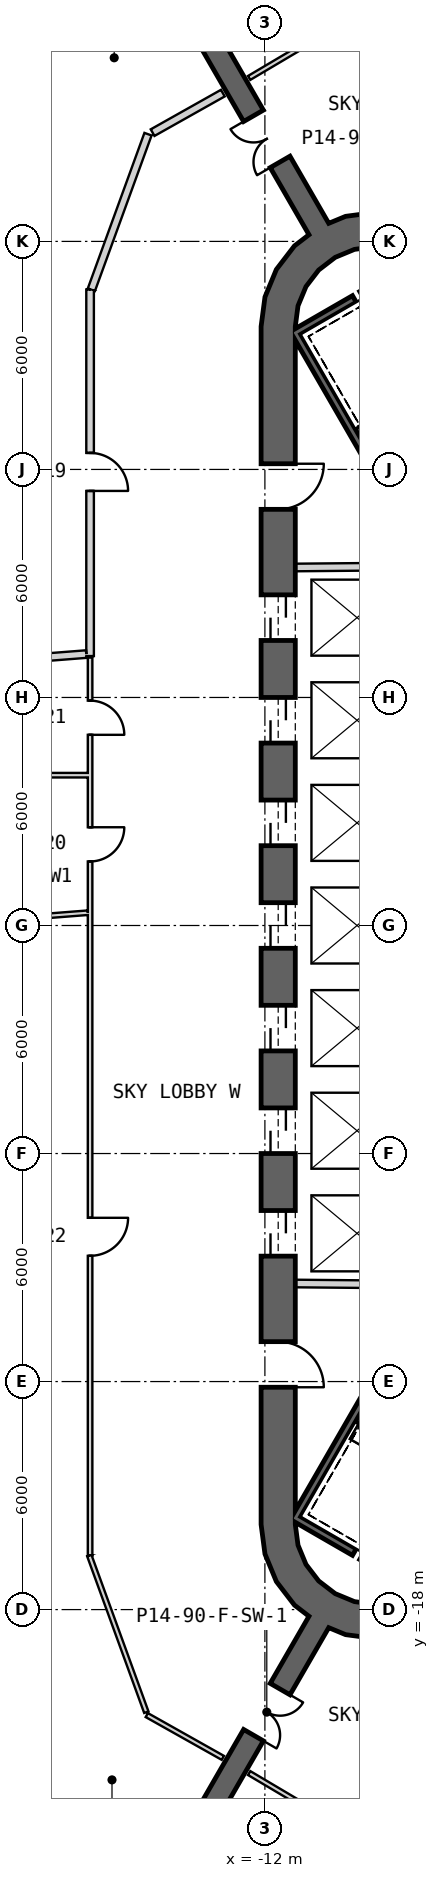
"""IFC4 building model, lengths in metres.
Left out: names, types, materials, properties, quantities, classifications, styles, units other than length and angle.
Written with IfcOpenShell. Run it as: python <this file> out.ifc"""

import sys

from ifc_helpers import new_model, si_unit, direction, frame, frame_2d, origin, place, context, subcontext, project, spatial, polyline, rectangle, outline, extrude, element, fill, save


model = new_model("IFC4")
c1 = context("Model", 3, precision=1e-05, world=origin(), true_north=direction((0.0, 1.0)))
c2 = subcontext(c1, "Body", "Model", "MODEL_VIEW")
j1 = project(units=[si_unit("LENGTHUNIT", "METRE"), si_unit("PLANEANGLEUNIT", "RADIAN")], contexts=[c1])
p1 = place(None, origin())
s1 = spatial("IfcSite", under=j1, at=p1, CompositionType="ELEMENT")
p2 = place(p1, origin())
s2 = spatial("IfcBuilding", under=s1, at=p2, CompositionType="ELEMENT")
p3 = place(p2, frame((0.0, 0.0, 392.3)))
s3 = spatial("IfcBuildingStorey", under=s2, at=p3, CompositionType="ELEMENT", Elevation=392.3)
p4 = place(p3, frame((-11.65, 15.762, 0.0), z_axis=(0.0, 0.0, 1.0), x_axis=(0.0, -1.0, 0.0)))
e1 = element("IfcWall", 1, at=p4, inside=s3, PredefinedType="SHEAR", context=c2, shape_type="SweptSolid", body=[
    extrude(rectangle(XDim=31.523, YDim=0.9, at=frame_2d((15.762, 0.0))), origin(), (0.0, 0.0, 1.0), 6.0),
])
p5 = place(p4, frame((7.062, 0.0, 0.0)))
e2 = element("IfcOpeningElement", 2, at=p5, cuts=e1, PredefinedType="OPENING", context=c2, shape_type="SweptSolid", body=[
    extrude(rectangle(XDim=1.2, YDim=2.4, at=frame_2d((0.6, 1.2))), frame((0.0, 0.46, 0.0), z_axis=(0.0, -1.0, 0.0), x_axis=(1.0, 0.0, 0.0)), (0.0, 0.0, 1.0), 0.92),
])
p6 = place(p4, frame((9.762, 0.0, 0.0)))
e3 = element("IfcOpeningElement", 3, at=p6, cuts=e1, PredefinedType="OPENING", context=c2, shape_type="SweptSolid", body=[
    extrude(rectangle(XDim=1.2, YDim=2.4, at=frame_2d((0.6, 1.2))), frame((0.0, 0.46, 0.0), z_axis=(0.0, -1.0, 0.0), x_axis=(1.0, 0.0, 0.0)), (0.0, 0.0, 1.0), 0.92),
])
p7 = place(p4, frame((12.462, 0.0, 0.0)))
e4 = element("IfcOpeningElement", 4, at=p7, cuts=e1, PredefinedType="OPENING", context=c2, shape_type="SweptSolid", body=[
    extrude(rectangle(XDim=1.2, YDim=2.4, at=frame_2d((0.6, 1.2))), frame((0.0, 0.46, 0.0), z_axis=(0.0, -1.0, 0.0), x_axis=(1.0, 0.0, 0.0)), (0.0, 0.0, 1.0), 0.92),
])
p8 = place(p4, frame((15.162, 0.0, 0.0)))
e5 = element("IfcOpeningElement", 5, at=p8, cuts=e1, PredefinedType="OPENING", context=c2, shape_type="SweptSolid", body=[
    extrude(rectangle(XDim=1.2, YDim=2.4, at=frame_2d((0.6, 1.2))), frame((0.0, 0.46, 0.0), z_axis=(0.0, -1.0, 0.0), x_axis=(1.0, 0.0, 0.0)), (0.0, 0.0, 1.0), 0.92),
])
p9 = place(p4, frame((17.862, 0.0, 0.0)))
e6 = element("IfcOpeningElement", 6, at=p9, cuts=e1, PredefinedType="OPENING", context=c2, shape_type="SweptSolid", body=[
    extrude(rectangle(XDim=1.2, YDim=2.4, at=frame_2d((0.6, 1.2))), frame((0.0, 0.46, 0.0), z_axis=(0.0, -1.0, 0.0), x_axis=(1.0, 0.0, 0.0)), (0.0, 0.0, 1.0), 0.92),
])
p10 = place(p4, frame((20.562, 0.0, 0.0)))
e7 = element("IfcOpeningElement", 7, at=p10, cuts=e1, PredefinedType="OPENING", context=c2, shape_type="SweptSolid", body=[
    extrude(rectangle(XDim=1.2, YDim=2.4, at=frame_2d((0.6, 1.2))), frame((0.0, 0.46, 0.0), z_axis=(0.0, -1.0, 0.0), x_axis=(1.0, 0.0, 0.0)), (0.0, 0.0, 1.0), 0.92),
])
p11 = place(p4, frame((23.262, 0.0, 0.0)))
e8 = element("IfcOpeningElement", 8, at=p11, cuts=e1, PredefinedType="OPENING", context=c2, shape_type="SweptSolid", body=[
    extrude(rectangle(XDim=1.2, YDim=2.4, at=frame_2d((0.6, 1.2))), frame((0.0, 0.46, 0.0), z_axis=(0.0, -1.0, 0.0), x_axis=(1.0, 0.0, 0.0)), (0.0, 0.0, 1.0), 0.92),
])
p12 = place(p4, frame((3.612, 0.0, 0.0)))
e9 = element("IfcOpeningElement", 9, at=p12, cuts=e1, PredefinedType="OPENING", context=c2, shape_type="SweptSolid", body=[
    extrude(rectangle(XDim=1.2, YDim=2.4, at=frame_2d((0.6, 1.2))), frame((0.0, 0.46, 0.0), z_axis=(0.0, -1.0, 0.0), x_axis=(1.0, 0.0, 0.0)), (0.0, 0.0, 1.0), 0.92),
])
p13 = place(p4, frame((26.712, 0.0, 0.0)))
e10 = element("IfcOpeningElement", 10, at=p13, cuts=e1, PredefinedType="OPENING", context=c2, shape_type="SweptSolid", body=[
    extrude(rectangle(XDim=1.2, YDim=2.4, at=frame_2d((0.6, 1.2))), frame((0.0, 0.46, 0.0), z_axis=(0.0, -1.0, 0.0), x_axis=(1.0, 0.0, 0.0)), (0.0, 0.0, 1.0), 0.92),
])
p14 = place(p3, origin())
e11 = element("IfcWall", 11, at=p14, inside=s3, PredefinedType="SHEAR", context=c2, shape_type="SweptSolid", body=[
    extrude(outline(polyline([(-7.6, 18.36), (-8.323, 18.659), (-9.1, 18.762), (-9.876, 18.659), (-10.6, 18.36), (-11.221, 17.883), (-11.698, 17.262), (-11.998, 16.538), (-12.1, 15.762), (-11.2, 15.762), (-11.128, 16.305), (-10.919, 16.812), (-10.585, 17.247), (-10.15, 17.58), (-9.644, 17.79), (-9.1, 17.862), (-8.556, 17.79), (-8.05, 17.58), (-7.6, 18.36)])), origin(), (0.0, 0.0, 1.0), 6.0),
])
p15 = place(p3, origin())
e12 = element("IfcWall", 12, at=p15, inside=s3, PredefinedType="SHEAR", context=c2, shape_type="SweptSolid", body=[
    extrude(outline(polyline([(-12.1, -15.762), (-11.998, -16.538), (-11.698, -17.262), (-11.221, -17.883), (-10.6, -18.36), (-9.876, -18.659), (-9.1, -18.762), (-8.323, -18.659), (-7.6, -18.36), (-8.05, -17.58), (-8.556, -17.79), (-9.1, -17.862), (-9.644, -17.79), (-10.15, -17.58), (-10.585, -17.247), (-10.919, -16.812), (-11.128, -16.305), (-11.2, -15.762), (-12.1, -15.762)])), origin(), (0.0, 0.0, 1.0), 6.0),
])
p16 = place(p3, frame((-10.575, 18.316, 0.0), z_axis=(0.0, 0.0, 1.0), x_axis=(-0.500011655475, 0.866018674388, 0.0)))
e13 = element("IfcWall", 13, at=p16, inside=s3, PredefinedType="SHEAR", context=c2, shape_type="SweptSolid", body=[
    extrude(rectangle(XDim=6.455, YDim=0.6, at=frame_2d((3.228, 0.0))), origin(), (0.0, 0.0, 1.0), 6.0),
])
p17 = place(p16, frame((2.05, 0.0, 0.0)))
e14 = element("IfcOpeningElement", 14, at=p17, cuts=e13, PredefinedType="OPENING", context=c2, shape_type="SweptSolid", body=[
    extrude(rectangle(XDim=1.4, YDim=2.4, at=frame_2d((0.7, 1.2))), frame((0.0, 0.31, 0.0), z_axis=(0.0, -1.0, 0.0), x_axis=(1.0, 0.0, 0.0)), (0.0, 0.0, 1.0), 0.62),
])
p18 = place(p3, frame((-10.575, -18.316, 0.0), z_axis=(0.0, 0.0, 1.0), x_axis=(-0.500011655475, -0.866018674388, 0.0)))
e15 = element("IfcWall", 15, at=p18, inside=s3, PredefinedType="SHEAR", context=c2, shape_type="SweptSolid", body=[
    extrude(rectangle(XDim=6.455, YDim=0.6, at=frame_2d((3.228, 0.0))), origin(), (0.0, 0.0, 1.0), 6.0),
])
p19 = place(p18, frame((2.05, 0.0, 0.0)))
e16 = element("IfcOpeningElement", 16, at=p19, cuts=e15, PredefinedType="OPENING", context=c2, shape_type="SweptSolid", body=[
    extrude(rectangle(XDim=1.4, YDim=2.4, at=frame_2d((0.7, 1.2))), frame((0.0, 0.31, 0.0), z_axis=(0.0, -1.0, 0.0), x_axis=(1.0, 0.0, 0.0)), (0.0, 0.0, 1.0), 0.62),
])
p20 = place(p3, frame((-11.2, 9.42, 0.0), z_axis=(0.0, 0.0, 1.0), x_axis=(0.999957167047, 0.009255488683, 0.0)))
e17 = element("IfcWall", 17, at=p20, inside=s3, PredefinedType="PLUMBINGWALL", context=c2, shape_type="SweptSolid", body=[
    extrude(rectangle(XDim=3.35, YDim=0.2, at=frame_2d((1.675, 0.0))), origin(), (0.0, 0.0, 1.0), 5.7),
])
p21 = place(p3, frame((-8.05, -9.449, 0.0), z_axis=(0.0, 0.0, 1.0), x_axis=(-0.999957467379, 0.009222983926, 0.0)))
e18 = element("IfcWall", 18, at=p21, inside=s3, PredefinedType="PLUMBINGWALL", context=c2, shape_type="SweptSolid", body=[
    extrude(rectangle(XDim=3.15, YDim=0.2, at=frame_2d((1.575, 0.0))), origin(), (0.0, 0.0, 1.0), 5.7),
])
p22 = place(p3, frame((-11.245, 15.678, -0.35), z_axis=(0.0, 0.0, 1.0), x_axis=(0.499977274689, -0.866038523851, 0.0)))
e19 = element("IfcWall", 19, at=p22, inside=s3, PredefinedType="SHEAR", context=c2, shape_type="SweptSolid", body=[
    extrude(rectangle(XDim=8.1, YDim=0.2, at=frame_2d((4.05, 0.0))), origin(), (0.0, 0.0, 1.0), 6.05),
])
p23 = place(p3, frame((-9.645, 16.486, -0.35), z_axis=(0.0, 0.0, 1.0), x_axis=(-0.866038843867, -0.499976720371, 0.0)))
e20 = element("IfcWall", 20, at=p23, inside=s3, PredefinedType="SHEAR", context=c2, shape_type="SweptSolid", body=[
    extrude(rectangle(XDim=1.69, YDim=0.2, at=frame_2d((0.845, 0.0))), origin(), (0.0, 0.0, 1.0), 6.05),
])
p24 = place(p3, frame((-11.282, -15.541, -0.35), z_axis=(0.0, 0.0, 1.0), x_axis=(0.866000578957, -0.500042995397, 0.0)))
e21 = element("IfcWall", 21, at=p24, inside=s3, PredefinedType="SHEAR", context=c2, shape_type="SweptSolid", body=[
    extrude(rectangle(XDim=1.89, YDim=0.2, at=frame_2d((0.945, 0.0))), origin(), (0.0, 0.0, 1.0), 6.05),
])
p25 = place(p3, frame((-7.196, -8.663, -0.35), z_axis=(0.0, 0.0, 1.0), x_axis=(-0.499997992926, -0.866026562566, 0.0)))
e22 = element("IfcWall", 22, at=p25, inside=s3, PredefinedType="SHEAR", context=c2, shape_type="SweptSolid", body=[
    extrude(rectangle(XDim=7.9, YDim=0.2, at=frame_2d((3.95, 0.0))), origin(), (0.0, 0.0, 1.0), 6.05),
])
p26 = place(p3, frame((-16.6, 16.734, 0.0), z_axis=(0.0, 0.0, 1.0), x_axis=(0.0, -1.0, 0.0)))
e23 = element("IfcWall", 23, at=p26, inside=s3, PredefinedType="PARTITIONING", context=c2, shape_type="SweptSolid", body=[
    extrude(rectangle(XDim=9.645, YDim=0.2, at=frame_2d((4.823, 0.0))), origin(), (0.0, 0.0, 1.0), 5.07),
])
p27 = place(p26, frame((4.3, 0.0, 0.0)))
e24 = element("IfcOpeningElement", 24, at=p27, cuts=e23, PredefinedType="OPENING", context=c2, shape_type="SweptSolid", body=[
    extrude(rectangle(XDim=1.0, YDim=2.1, at=frame_2d((0.5, 1.05))), frame((0.0, 0.11, 0.0), z_axis=(0.0, -1.0, 0.0), x_axis=(1.0, 0.0, 0.0)), (0.0, 0.0, 1.0), 0.22),
])
p28 = place(p3, frame((-15.076, 20.822, 0.0), z_axis=(0.0, 0.0, 1.0), x_axis=(-0.342071567328, -0.939673902386, 0.0)))
e25 = element("IfcWall", 25, at=p28, inside=s3, PredefinedType="PARTITIONING", context=c2, shape_type="SweptSolid", body=[
    extrude(rectangle(XDim=4.356, YDim=0.2, at=frame_2d((2.178, 0.0))), origin(), (0.0, 0.0, 1.0), 5.07),
])
p29 = place(p3, frame((-13.107, 21.902, 0.0), z_axis=(0.0, 0.0, 1.0), x_axis=(-0.871581686769, -0.490250306772, 0.0)))
e26 = element("IfcWall", 26, at=p29, inside=s3, PredefinedType="PARTITIONING", context=c2, shape_type="SweptSolid", body=[
    extrude(rectangle(XDim=2.12, YDim=0.2, at=frame_2d((1.06, 0.0))), origin(), (0.0, 0.0, 1.0), 5.7),
])
p30 = place(p3, frame((-16.6, 7.049, 0.0), z_axis=(0.0, 0.0, 1.0), x_axis=(0.0, -1.0, 0.0)))
e27 = element("IfcWall", 27, at=p30, inside=s3, PredefinedType="PARTITIONING", context=c2, shape_type="SweptSolid", body=[
    extrude(rectangle(XDim=6.706, YDim=0.12, at=frame_2d((3.353, 0.0))), origin(), (0.0, 0.0, 1.0), 5.17),
])
p31 = place(p30, frame((4.464, 0.0, 0.0)))
e28 = element("IfcOpeningElement", 28, at=p31, cuts=e27, PredefinedType="OPENING", context=c2, shape_type="SweptSolid", body=[
    extrude(rectangle(XDim=0.9, YDim=2.1, at=frame_2d((0.45, 1.05))), frame((0.0, 0.07, 0.0), z_axis=(0.0, -1.0, 0.0), x_axis=(1.0, 0.0, 0.0)), (0.0, 0.0, 1.0), 0.14),
])
p32 = place(p30, frame((1.132, 0.0, 0.0)))
e29 = element("IfcOpeningElement", 29, at=p32, cuts=e27, PredefinedType="OPENING", context=c2, shape_type="SweptSolid", body=[
    extrude(rectangle(XDim=0.9, YDim=2.1, at=frame_2d((0.45, 1.05))), frame((0.0, 0.07, 0.0), z_axis=(0.0, -1.0, 0.0), x_axis=(1.0, 0.0, 0.0)), (0.0, 0.0, 1.0), 0.14),
])
p33 = place(p3, frame((-16.6, 0.344, 0.0), z_axis=(0.0, 0.0, 1.0), x_axis=(0.0, -1.0, 0.0)))
e30 = element("IfcWall", 30, at=p33, inside=s3, PredefinedType="PARTITIONING", context=c2, shape_type="SweptSolid", body=[
    extrude(rectangle(XDim=16.918, YDim=0.12, at=frame_2d((8.459, 0.0))), origin(), (0.0, 0.0, 1.0), 5.07),
])
p34 = place(p33, frame((8.035, 0.0, 0.0)))
e31 = element("IfcOpeningElement", 31, at=p34, cuts=e30, PredefinedType="OPENING", context=c2, shape_type="SweptSolid", body=[
    extrude(rectangle(XDim=1.0, YDim=2.1, at=frame_2d((0.5, 1.05))), frame((0.0, 0.07, 0.0), z_axis=(0.0, -1.0, 0.0), x_axis=(1.0, 0.0, 0.0)), (0.0, 0.0, 1.0), 0.14),
])
p35 = place(p3, frame((-15.108, -20.776, 0.0), z_axis=(0.0, 0.0, 1.0), x_axis=(0.87159257267, -0.490230952986, 0.0)))
e32 = element("IfcWall", 32, at=p35, inside=s3, PredefinedType="PARTITIONING", context=c2, shape_type="SweptSolid", body=[
    extrude(rectangle(XDim=2.296, YDim=0.12, at=frame_2d((1.148, 0.0))), origin(), (0.0, 0.0, 1.0), 5.7),
])
p36 = place(p3, frame((-16.621, -16.578, 0.0), z_axis=(0.0, 0.0, 1.0), x_axis=(0.342055849832, -0.939679623912, 0.0)))
e33 = element("IfcWall", 33, at=p36, inside=s3, PredefinedType="PARTITIONING", context=c2, shape_type="SweptSolid", body=[
    extrude(rectangle(XDim=4.387, YDim=0.12, at=frame_2d((2.193, 0.0))), origin(), (0.0, 0.0, 1.0), 5.07),
])
p37 = place(p3, frame((-18.604, 6.993, 0.0), z_axis=(0.0, 0.0, 1.0), x_axis=(0.99697500106, 0.077722887632, 0.0)))
e34 = element("IfcWall", 34, at=p37, inside=s3, PredefinedType="PARTITIONING", context=c2, shape_type="SweptSolid", body=[
    extrude(rectangle(XDim=1.91, YDim=0.2, at=frame_2d((0.955, 0.0))), origin(), (0.0, 0.0, 1.0), 4.07),
])
p38 = place(p3, frame((-16.66, 3.955, 0.0), z_axis=(0.0, 0.0, 1.0), x_axis=(-1.0, 0.0, 0.0)))
e35 = element("IfcWall", 35, at=p38, inside=s3, PredefinedType="PARTITIONING", context=c2, shape_type="SweptSolid", body=[
    extrude(rectangle(XDim=1.944, YDim=0.12, at=frame_2d((0.972, 0.0))), origin(), (0.0, 0.0, 1.0), 4.07),
])
p39 = place(p3, frame((-16.66, 0.336, 0.0), z_axis=(0.0, 0.0, 1.0), x_axis=(-0.996963204586, -0.077874056669, 0.0)))
e36 = element("IfcWall", 36, at=p39, inside=s3, PredefinedType="PARTITIONING", context=c2, shape_type="SweptSolid", body=[
    extrude(rectangle(XDim=1.95, YDim=0.12, at=frame_2d((0.975, 0.0))), origin(), (0.0, 0.0, 1.0), 4.07),
])
p40 = place(p3, frame((-10.438, 23.472, 0.0), z_axis=(0.0, 0.0, 1.0), x_axis=(-0.860350247392, -0.509703297824, 0.0)))
e37 = element("IfcWall", 37, at=p40, inside=s3, PredefinedType="PARTITIONING", context=c2, shape_type="SweptSolid", body=[
    extrude(rectangle(XDim=2.296, YDim=0.12, at=frame_2d((1.148, 0.0))), origin(), (0.0, 0.0, 1.0), 5.7),
])
p41 = place(p3, frame((-6.047, 22.683, 0.0), z_axis=(0.0, 0.0, 1.0), x_axis=(-0.984807082904, 0.173651977996, 0.0)))
e38 = element("IfcWall", 38, at=p41, inside=s3, PredefinedType="PARTITIONING", context=c2, shape_type="SweptSolid", body=[
    extrude(rectangle(XDim=4.386, YDim=0.12, at=frame_2d((2.193, 0.0))), origin(), (0.0, 0.0, 1.0), 5.07),
])
p42 = place(p3, frame((-10.479, -23.464, 0.0), z_axis=(0.0, 0.0, 1.0), x_axis=(0.984812129081, 0.173623357916, 0.0)))
e39 = element("IfcWall", 39, at=p42, inside=s3, PredefinedType="PARTITIONING", context=c2, shape_type="SweptSolid", body=[
    extrude(rectangle(XDim=3.439, YDim=0.12, at=frame_2d((1.72, 0.0))), origin(), (0.0, 0.0, 1.0), 5.07),
])
p43 = place(p42, frame((1.222, 0.0, 0.0)))
e40 = element("IfcOpeningElement", 40, at=p43, cuts=e39, PredefinedType="OPENING", context=c2, shape_type="SweptSolid", body=[
    extrude(rectangle(XDim=1.0, YDim=2.1, at=frame_2d((0.5, 1.05))), frame((0.0, 0.07, 0.0), z_axis=(0.0, -1.0, 0.0), x_axis=(1.0, 0.0, 0.0)), (0.0, 0.0, 1.0), 0.14),
])
p44 = place(p3, frame((-12.414, -22.302, 0.0), z_axis=(0.0, 0.0, 1.0), x_axis=(0.860362411229, -0.509682765398, 0.0)))
e41 = element("IfcWall", 41, at=p44, inside=s3, PredefinedType="PARTITIONING", context=c2, shape_type="SweptSolid", body=[
    extrude(rectangle(XDim=2.182, YDim=0.12, at=frame_2d((1.091, 0.0))), origin(), (0.0, 0.0, 1.0), 5.7),
])
p45 = place(p27, origin())
e42 = element("IfcDoor", 42, at=p45, inside=s3, OperationType="SINGLE_SWING_RIGHT", PredefinedType="USERDEFINED", context=c2, shape_type="SweptSolid", body=[
    extrude(rectangle(XDim=1.0, YDim=2.1, at=frame_2d((0.5, 1.05))), frame((0.0, 0.025, 0.0), z_axis=(0.0, -1.0, 0.0), x_axis=(1.0, 0.0, 0.0)), (0.0, 0.0, 1.0), 0.05),
])
fill(e24, e42)
p46 = place(p31, origin())
e43 = element("IfcDoor", 43, at=p46, inside=s3, OperationType="SINGLE_SWING_LEFT", PredefinedType="NOTDEFINED", context=c2, shape_type="SweptSolid", body=[
    extrude(rectangle(XDim=0.9, YDim=2.1, at=frame_2d((0.45, 1.05))), frame((0.0, 0.025, 0.0), z_axis=(0.0, -1.0, 0.0), x_axis=(1.0, 0.0, 0.0)), (0.0, 0.0, 1.0), 0.05),
])
fill(e28, e43)
p47 = place(p32, origin())
e44 = element("IfcDoor", 44, at=p47, inside=s3, OperationType="SINGLE_SWING_RIGHT", PredefinedType="NOTDEFINED", context=c2, shape_type="SweptSolid", body=[
    extrude(rectangle(XDim=0.9, YDim=2.1, at=frame_2d((0.45, 1.05))), frame((0.0, 0.025, 0.0), z_axis=(0.0, -1.0, 0.0), x_axis=(1.0, 0.0, 0.0)), (0.0, 0.0, 1.0), 0.05),
])
fill(e29, e44)
p48 = place(p34, origin())
e45 = element("IfcDoor", 45, at=p48, inside=s3, OperationType="SINGLE_SWING_LEFT", PredefinedType="NOTDEFINED", context=c2, shape_type="SweptSolid", body=[
    extrude(rectangle(XDim=1.0, YDim=2.1, at=frame_2d((0.5, 1.05))), frame((0.0, 0.025, 0.0), z_axis=(0.0, -1.0, 0.0), x_axis=(1.0, 0.0, 0.0)), (0.0, 0.0, 1.0), 0.05),
])
fill(e31, e45)
p49 = place(p5, origin())
e46 = element("IfcDoor", 46, at=p49, inside=s3, OperationType="SLIDING_TO_LEFT", PredefinedType="USERDEFINED", context=c2, shape_type="SweptSolid", body=[
    extrude(rectangle(XDim=1.2, YDim=2.4, at=frame_2d((0.6, 1.2))), frame((0.0, 0.025, 0.0), z_axis=(0.0, -1.0, 0.0), x_axis=(1.0, 0.0, 0.0)), (0.0, 0.0, 1.0), 0.05),
])
fill(e2, e46)
p50 = place(p6, origin())
e47 = element("IfcDoor", 47, at=p50, inside=s3, OperationType="SLIDING_TO_LEFT", PredefinedType="USERDEFINED", context=c2, shape_type="SweptSolid", body=[
    extrude(rectangle(XDim=1.2, YDim=2.4, at=frame_2d((0.6, 1.2))), frame((0.0, 0.025, 0.0), z_axis=(0.0, -1.0, 0.0), x_axis=(1.0, 0.0, 0.0)), (0.0, 0.0, 1.0), 0.05),
])
fill(e3, e47)
p51 = place(p7, origin())
e48 = element("IfcDoor", 48, at=p51, inside=s3, OperationType="SLIDING_TO_LEFT", PredefinedType="USERDEFINED", context=c2, shape_type="SweptSolid", body=[
    extrude(rectangle(XDim=1.2, YDim=2.4, at=frame_2d((0.6, 1.2))), frame((0.0, 0.025, 0.0), z_axis=(0.0, -1.0, 0.0), x_axis=(1.0, 0.0, 0.0)), (0.0, 0.0, 1.0), 0.05),
])
fill(e4, e48)
p52 = place(p8, origin())
e49 = element("IfcDoor", 49, at=p52, inside=s3, OperationType="SLIDING_TO_LEFT", PredefinedType="USERDEFINED", context=c2, shape_type="SweptSolid", body=[
    extrude(rectangle(XDim=1.2, YDim=2.4, at=frame_2d((0.6, 1.2))), frame((0.0, 0.025, 0.0), z_axis=(0.0, -1.0, 0.0), x_axis=(1.0, 0.0, 0.0)), (0.0, 0.0, 1.0), 0.05),
])
fill(e5, e49)
p53 = place(p9, origin())
e50 = element("IfcDoor", 50, at=p53, inside=s3, OperationType="SLIDING_TO_LEFT", PredefinedType="USERDEFINED", context=c2, shape_type="SweptSolid", body=[
    extrude(rectangle(XDim=1.2, YDim=2.4, at=frame_2d((0.6, 1.2))), frame((0.0, 0.025, 0.0), z_axis=(0.0, -1.0, 0.0), x_axis=(1.0, 0.0, 0.0)), (0.0, 0.0, 1.0), 0.05),
])
fill(e6, e50)
p54 = place(p10, origin())
e51 = element("IfcDoor", 51, at=p54, inside=s3, OperationType="SLIDING_TO_LEFT", PredefinedType="USERDEFINED", context=c2, shape_type="SweptSolid", body=[
    extrude(rectangle(XDim=1.2, YDim=2.4, at=frame_2d((0.6, 1.2))), frame((0.0, 0.025, 0.0), z_axis=(0.0, -1.0, 0.0), x_axis=(1.0, 0.0, 0.0)), (0.0, 0.0, 1.0), 0.05),
])
fill(e7, e51)
p55 = place(p11, origin())
e52 = element("IfcDoor", 52, at=p55, inside=s3, OperationType="SLIDING_TO_LEFT", PredefinedType="USERDEFINED", context=c2, shape_type="SweptSolid", body=[
    extrude(rectangle(XDim=1.2, YDim=2.4, at=frame_2d((0.6, 1.2))), frame((0.0, 0.025, 0.0), z_axis=(0.0, -1.0, 0.0), x_axis=(1.0, 0.0, 0.0)), (0.0, 0.0, 1.0), 0.05),
])
fill(e8, e52)
p56 = place(p12, origin())
e53 = element("IfcDoor", 53, at=p56, inside=s3, OperationType="SINGLE_SWING_LEFT", PredefinedType="USERDEFINED", context=c2, shape_type="SweptSolid", body=[
    extrude(rectangle(XDim=1.2, YDim=2.4, at=frame_2d((0.6, 1.2))), frame((0.0, 0.025, 0.0), z_axis=(0.0, -1.0, 0.0), x_axis=(1.0, 0.0, 0.0)), (0.0, 0.0, 1.0), 0.05),
])
fill(e9, e53)
p57 = place(p13, origin())
e54 = element("IfcDoor", 54, at=p57, inside=s3, OperationType="SINGLE_SWING_RIGHT", PredefinedType="USERDEFINED", context=c2, shape_type="SweptSolid", body=[
    extrude(rectangle(XDim=1.2, YDim=2.4, at=frame_2d((0.6, 1.2))), frame((0.0, 0.025, 0.0), z_axis=(0.0, -1.0, 0.0), x_axis=(1.0, 0.0, 0.0)), (0.0, 0.0, 1.0), 0.05),
])
fill(e10, e54)
p58 = place(p17, origin())
e55 = element("IfcDoor", 55, at=p58, inside=s3, OperationType="DOUBLE_DOOR_SINGLE_SWING", PredefinedType="NOTDEFINED", context=c2, shape_type="SweptSolid", body=[
    extrude(rectangle(XDim=1.4, YDim=2.4, at=frame_2d((0.7, 1.2))), frame((0.0, 0.025, 0.0), z_axis=(0.0, -1.0, 0.0), x_axis=(1.0, 0.0, 0.0)), (0.0, 0.0, 1.0), 0.05),
])
fill(e14, e55)
p59 = place(p19, origin())
e56 = element("IfcDoor", 56, at=p59, inside=s3, OperationType="DOUBLE_DOOR_SINGLE_SWING", PredefinedType="NOTDEFINED", context=c2, shape_type="SweptSolid", body=[
    extrude(rectangle(XDim=1.4, YDim=2.4, at=frame_2d((0.7, 1.2))), frame((0.0, 0.025, 0.0), z_axis=(0.0, -1.0, 0.0), x_axis=(1.0, 0.0, 0.0)), (0.0, 0.0, 1.0), 0.05),
])
fill(e16, e56)
save(model, sys.argv[1])
